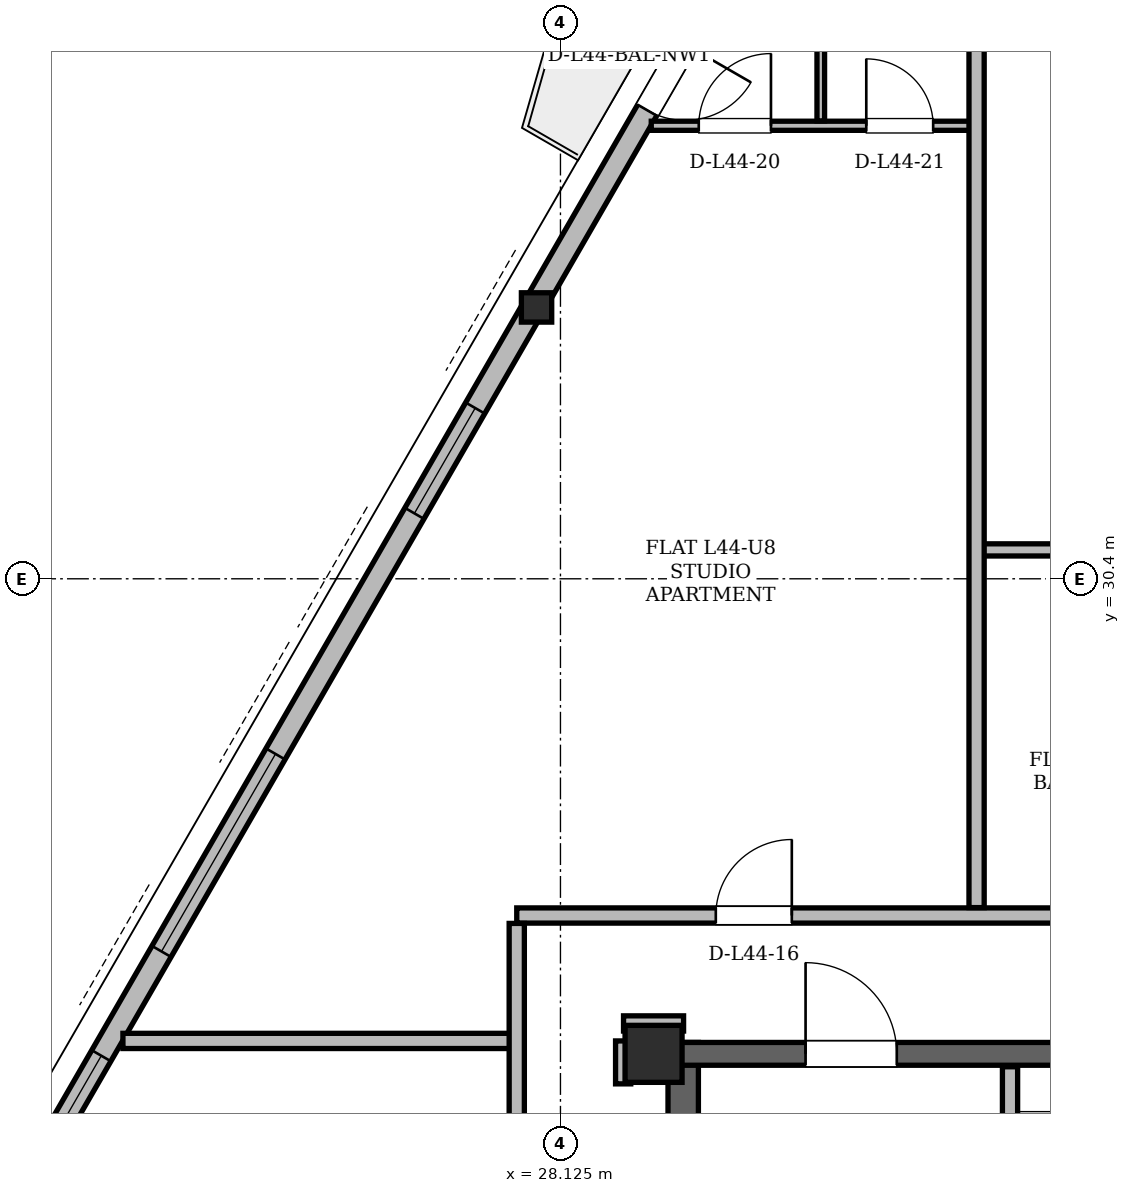
"""IFC4 building model, lengths in metres.
Left out: names, types, materials, properties, quantities, classifications, styles, units other than length and angle.
Written with IfcOpenShell. Run it as: python <this file> out.ifc"""

import sys

from ifc_helpers import new_model, si_unit, direction, frame, frame_2d, origin, origin_2d, place, context, subcontext, project, spatial, rectangle, hollow_rectangle, i_section, extrude, element, fill, save


model = new_model("IFC4")
c1 = context("Model", 3, precision=1e-05, world=origin(), true_north=direction((0.0, 1.0)))
c2 = subcontext(c1, "Body", "Model", "MODEL_VIEW")
j1 = project(units=[si_unit("LENGTHUNIT", "METRE"), si_unit("PLANEANGLEUNIT", "RADIAN")], contexts=[c1])
p1 = place(None, origin())
s1 = spatial("IfcSite", under=j1, at=p1, CompositionType="ELEMENT")
p2 = place(p1, origin())
s2 = spatial("IfcBuilding", under=s1, at=p2, CompositionType="ELEMENT")
p3 = place(p2, frame((0.0, 0.0, 167.4)))
s3 = spatial("IfcBuildingStorey", under=s2, at=p3, CompositionType="ELEMENT", Elevation=167.4)
p4 = place(p3, frame((29.35, 24.15, 0.0), z_axis=(0.0, 0.0, 1.0), x_axis=(1.0, 0.0, 0.0)))
e1 = element("IfcColumn", 1, at=p4, inside=s3, PredefinedType="COLUMN", context=c2, shape_type="SweptSolid", body=[
    extrude(hollow_rectangle(XDim=0.75, YDim=0.75, WallThickness=0.06, at=origin_2d()), origin(), (0.0, 0.0, 1.0), 3.6),
])
p5 = place(p3, frame((27.775, 33.983, 0.005), z_axis=(0.019643523819, -0.00727286176, 0.999780594658), x_axis=(0.34720866797, 0.937787897601, 0.0)))
e2 = element("IfcColumn", 2, at=p5, inside=s3, PredefinedType="COLUMN", context=c2, shape_type="SweptSolid", body=[
    extrude(i_section(OverallWidth=0.399, OverallDepth=0.386, WebThickness=0.021, FlangeThickness=0.033, at=origin_2d()), origin(), (0.0, 0.0, 1.0), 3.592),
])
p6 = place(p3, frame((29.74, 11.0, 0.0), z_axis=(0.0, 0.0, 1.0), x_axis=(0.0, 1.0, 0.0)))
e3 = element("IfcWall", 3, at=p6, inside=s3, PredefinedType="SHEAR", context=c2, shape_type="SweptSolid", body=[
    extrude(rectangle(XDim=13.3, YDim=0.4, at=frame_2d((6.65, 0.0))), origin(), (0.0, 0.0, 1.0), 3.38),
])
p7 = place(p3, frame((29.65, 24.15, 0.0), z_axis=(0.0, 0.0, 1.0), x_axis=(1.0, 0.0, 0.0)))
e4 = element("IfcWall", 4, at=p7, inside=s3, PredefinedType="SHEAR", context=c2, shape_type="SweptSolid", body=[
    extrude(rectangle(XDim=15.7, YDim=0.3, at=frame_2d((7.85, 0.0))), origin(), (0.0, 0.0, 1.0), 3.38),
])
p8 = place(p7, frame((1.7, 0.0, 0.0)))
e5 = element("IfcOpeningElement", 5, at=p8, cuts=e4, PredefinedType="OPENING", context=c2, shape_type="SweptSolid", body=[
    extrude(rectangle(XDim=1.2, YDim=2.2, at=frame_2d((0.6, 1.1))), frame((0.0, 0.15, 0.0), z_axis=(0.0, -1.0, 0.0), x_axis=(1.0, 0.0, 0.0)), (0.0, 0.0, 1.0), 0.3),
])
p9 = place(p7, frame((12.8, 0.0, 0.0)))
e6 = element("IfcOpeningElement", 6, at=p9, cuts=e4, PredefinedType="OPENING", context=c2, shape_type="SweptSolid", body=[
    extrude(rectangle(XDim=1.2, YDim=2.2, at=frame_2d((0.6, 1.1))), frame((0.0, 0.15, 0.0), z_axis=(0.0, -1.0, 0.0), x_axis=(1.0, 0.0, 0.0)), (0.0, 0.0, 1.0), 0.3),
])
p10 = place(p7, frame((6.55, 0.0, 0.0)))
e7 = element("IfcOpeningElement", 7, at=p10, cuts=e4, PredefinedType="OPENING", context=c2, shape_type="SweptSolid", body=[
    extrude(rectangle(XDim=0.9, YDim=2.05, at=frame_2d((0.45, 1.025))), frame((0.0, 0.15, 0.0), z_axis=(0.0, -1.0, 0.0), x_axis=(1.0, 0.0, 0.0)), (0.0, 0.0, 1.0), 0.3),
])
p11 = place(p7, frame((8.45, 0.0, 0.0)))
e8 = element("IfcOpeningElement", 8, at=p11, cuts=e4, PredefinedType="OPENING", context=c2, shape_type="SweptSolid", body=[
    extrude(rectangle(XDim=0.9, YDim=2.05, at=frame_2d((0.45, 1.025))), frame((0.0, 0.15, 0.0), z_axis=(0.0, -1.0, 0.0), x_axis=(1.0, 0.0, 0.0)), (0.0, 0.0, 1.0), 0.3),
])
p12 = place(p3, frame((33.146, 43.285, 0.0), z_axis=(0.0, 0.0, 1.0), x_axis=(-0.499997523705, -0.86602683347, 0.0)))
e9 = element("IfcWall", 9, at=p12, inside=s3, PredefinedType="SOLIDWALL", context=c2, shape_type="SweptSolid", body=[
    extrude(rectangle(XDim=35.802, YDim=0.29, at=frame_2d((17.901, 0.0))), origin(), (0.0, 0.0, 1.0), 2.6),
])
p13 = place(p12, frame((6.76, 0.0, 0.0)))
e10 = element("IfcOpeningElement", 10, at=p13, cuts=e9, PredefinedType="OPENING", context=c2, shape_type="SweptSolid", body=[
    extrude(rectangle(XDim=1.0, YDim=2.18, at=frame_2d((0.5, 1.09))), frame((0.0, 0.145, 0.0), z_axis=(0.0, -1.0, 0.0), x_axis=(1.0, 0.0, 0.0)), (0.0, 0.0, 1.0), 0.29),
])
p14 = place(p12, frame((26.688, 0.0, 0.0)))
e11 = element("IfcOpeningElement", 11, at=p14, cuts=e9, PredefinedType="OPENING", context=c2, shape_type="SweptSolid", body=[
    extrude(rectangle(XDim=1.5, YDim=2.2, at=frame_2d((0.75, 1.1))), frame((0.0, 0.145, 0.0), z_axis=(0.0, -1.0, 0.0), x_axis=(1.0, 0.0, 0.0)), (0.0, 0.0, 1.0), 0.29),
])
p15 = place(p12, frame((33.698, 0.0, 0.85)))
e12 = element("IfcOpeningElement", 12, at=p15, cuts=e9, PredefinedType="OPENING", context=c2, shape_type="SweptSolid", body=[
    extrude(rectangle(XDim=1.2, YDim=1.48, at=frame_2d((0.6, 0.74))), frame((0.0, 0.145, 0.0), z_axis=(0.0, -1.0, 0.0), x_axis=(1.0, 0.0, 0.0)), (0.0, 0.0, 1.0), 0.29),
])
p16 = place(p12, frame((22.123, 0.0, 0.85)))
e13 = element("IfcOpeningElement", 13, at=p16, cuts=e9, PredefinedType="OPENING", context=c2, shape_type="SweptSolid", body=[
    extrude(rectangle(XDim=1.2, YDim=1.48, at=frame_2d((0.6, 0.74))), frame((0.0, 0.145, 0.0), z_axis=(0.0, -1.0, 0.0), x_axis=(1.0, 0.0, 0.0)), (0.0, 0.0, 1.0), 0.29),
])
p17 = place(p12, frame((12.284, 0.0, 0.85)))
e14 = element("IfcOpeningElement", 14, at=p17, cuts=e9, PredefinedType="OPENING", context=c2, shape_type="SweptSolid", body=[
    extrude(rectangle(XDim=1.6, YDim=1.64, at=frame_2d((0.8, 0.82))), frame((0.0, 0.145, 0.0), z_axis=(0.0, -1.0, 0.0), x_axis=(1.0, 0.0, 0.0)), (0.0, 0.0, 1.0), 0.29),
])
p18 = place(p12, frame((17.539, 0.0, 0.85)))
e15 = element("IfcOpeningElement", 15, at=p18, cuts=e9, PredefinedType="OPENING", context=c2, shape_type="SweptSolid", body=[
    extrude(rectangle(XDim=3.0, YDim=1.64, at=frame_2d((1.5, 0.82))), frame((0.0, 0.145, 0.0), z_axis=(0.0, -1.0, 0.0), x_axis=(1.0, 0.0, 0.0)), (0.0, 0.0, 1.0), 0.29),
])
p19 = place(p12, frame((1.23, 0.0, 0.85)))
e16 = element("IfcOpeningElement", 16, at=p19, cuts=e9, PredefinedType="OPENING", context=c2, shape_type="SweptSolid", body=[
    extrude(rectangle(XDim=1.2, YDim=1.48, at=frame_2d((0.6, 0.74))), frame((0.0, 0.145, 0.0), z_axis=(0.0, -1.0, 0.0), x_axis=(1.0, 0.0, 0.0)), (0.0, 0.0, 1.0), 0.29),
])
p20 = place(p12, frame((30.487, 0.0, 0.85)))
e17 = element("IfcOpeningElement", 17, at=p20, cuts=e9, PredefinedType="OPENING", context=c2, shape_type="SweptSolid", body=[
    extrude(rectangle(XDim=1.2, YDim=1.48, at=frame_2d((0.6, 0.74))), frame((0.0, 0.145, 0.0), z_axis=(0.0, -1.0, 0.0), x_axis=(1.0, 0.0, 0.0)), (0.0, 0.0, 1.0), 0.29),
])
p21 = place(p3, frame((34.04, 19.48, 0.0), z_axis=(0.0, 0.0, 1.0), x_axis=(0.0, 1.0, 0.0)))
e18 = element("IfcWall", 18, at=p21, inside=s3, PredefinedType="PARTITIONING", context=c2, shape_type="SweptSolid", body=[
    extrude(rectangle(XDim=4.5, YDim=0.2, at=frame_2d((2.25, 0.0))), origin(), (0.0, 0.0, 1.0), 3.38),
])
p22 = place(p21, frame((2.12, 0.0, 0.0)))
e19 = element("IfcOpeningElement", 19, at=p22, cuts=e18, PredefinedType="OPENING", context=c2, shape_type="SweptSolid", body=[
    extrude(rectangle(XDim=1.1, YDim=2.2, at=frame_2d((0.55, 1.1))), frame((0.0, 0.1, 0.0), z_axis=(0.0, -1.0, 0.0), x_axis=(1.0, 0.0, 0.0)), (0.0, 0.0, 1.0), 0.2),
])
p23 = place(p3, frame((22.368, 24.32, 0.0), z_axis=(0.0, 0.0, 1.0), x_axis=(1.0, 0.0, 0.0)))
e20 = element("IfcWall", 20, at=p23, inside=s3, PredefinedType="PARTITIONING", context=c2, shape_type="SweptSolid", body=[
    extrude(rectangle(XDim=5.182, YDim=0.2, at=frame_2d((2.591, 0.0))), origin(), (0.0, 0.0, 1.0), 3.38),
])
p24 = place(p3, frame((28.955, 24.55, 0.0), z_axis=(0.0, 0.0, 1.0), x_axis=(1.0, 0.0, 0.0)))
e21 = element("IfcWall", 21, at=p24, inside=s3, PredefinedType="PARTITIONING", context=c2, shape_type="SweptSolid", body=[
    extrude(rectangle(XDim=0.79, YDim=0.2, at=frame_2d((0.395, 0.0))), origin(), (0.0, 0.0, 1.0), 2.842),
])
p25 = place(p3, frame((27.55, 25.97, 0.0), z_axis=(0.0, 0.0, 1.0), x_axis=(1.0, 0.0, 0.0)))
e22 = element("IfcWall", 22, at=p25, inside=s3, PredefinedType="PARTITIONING", context=c2, shape_type="SweptSolid", body=[
    extrude(rectangle(XDim=9.15, YDim=0.2, at=frame_2d((4.575, 0.0))), origin(), (0.0, 0.0, 1.0), 2.842),
])
p26 = place(p25, frame((2.619, 0.0, 0.0)))
e23 = element("IfcOpeningElement", 23, at=p26, cuts=e22, PredefinedType="OPENING", context=c2, shape_type="SweptSolid", body=[
    extrude(rectangle(XDim=1.0, YDim=2.18, at=frame_2d((0.5, 1.09))), frame((0.0, 0.1, 0.0), z_axis=(0.0, -1.0, 0.0), x_axis=(1.0, 0.0, 0.0)), (0.0, 0.0, 1.0), 0.2),
])
p27 = place(p3, frame((33.518, 30.78, 0.0), z_axis=(0.0, 0.0, 1.0), x_axis=(1.0, 0.0, 0.0)))
e24 = element("IfcWall", 24, at=p27, inside=s3, PredefinedType="PARTITIONING", context=c2, shape_type="SweptSolid", body=[
    extrude(rectangle(XDim=3.264, YDim=0.16, at=frame_2d((1.632, 0.0))), origin(), (0.0, 0.0, 1.0), 3.38),
])
p28 = place(p27, frame((1.192, 0.0, 0.0)))
e25 = element("IfcOpeningElement", 25, at=p28, cuts=e24, PredefinedType="OPENING", context=c2, shape_type="SweptSolid", body=[
    extrude(rectangle(XDim=0.88, YDim=2.08, at=frame_2d((0.44, 1.04))), frame((0.0, 0.08, 0.0), z_axis=(0.0, -1.0, 0.0), x_axis=(1.0, 0.0, 0.0)), (0.0, 0.0, 1.0), 0.16),
])
p29 = place(p3, frame((29.32, 36.36, 0.0), z_axis=(0.0, 0.0, 1.0), x_axis=(1.0, 0.0, 0.0)))
e26 = element("IfcWall", 26, at=p29, inside=s3, PredefinedType="PARTITIONING", context=c2, shape_type="SweptSolid", body=[
    extrude(rectangle(XDim=4.33, YDim=0.12, at=frame_2d((2.165, 0.0))), origin(), (0.0, 0.0, 1.0), 3.38),
])
p30 = place(p29, frame((0.625, 0.0, 0.0)))
e27 = element("IfcOpeningElement", 27, at=p30, cuts=e26, PredefinedType="OPENING", context=c2, shape_type="SweptSolid", body=[
    extrude(rectangle(XDim=0.95, YDim=2.1, at=frame_2d((0.475, 1.05))), frame((0.0, 0.06, 0.0), z_axis=(0.0, -1.0, 0.0), x_axis=(1.0, 0.0, 0.0)), (0.0, 0.0, 1.0), 0.12),
])
p31 = place(p29, frame((2.829, 0.0, 0.0)))
e28 = element("IfcOpeningElement", 28, at=p31, cuts=e26, PredefinedType="OPENING", context=c2, shape_type="SweptSolid", body=[
    extrude(rectangle(XDim=0.88, YDim=2.08, at=frame_2d((0.44, 1.04))), frame((0.0, 0.06, 0.0), z_axis=(0.0, -1.0, 0.0), x_axis=(1.0, 0.0, 0.0)), (0.0, 0.0, 1.0), 0.12),
])
p32 = place(p3, frame((27.55, 18.554, 0.0), z_axis=(0.0, 0.0, 1.0), x_axis=(0.0, 1.0, 0.0)))
e29 = element("IfcWall", 29, at=p32, inside=s3, PredefinedType="PARTITIONING", context=c2, shape_type="SweptSolid", body=[
    extrude(rectangle(XDim=7.312, YDim=0.2, at=frame_2d((3.656, 0.0))), origin(), (0.0, 0.0, 1.0), 3.38),
])
p33 = place(p32, frame((2.257, 0.0, 0.0)))
e30 = element("IfcOpeningElement", 30, at=p33, cuts=e29, PredefinedType="OPENING", context=c2, shape_type="SweptSolid", body=[
    extrude(rectangle(XDim=1.0, YDim=2.18, at=frame_2d((0.5, 1.09))), frame((0.0, 0.1, 0.0), z_axis=(0.0, -1.0, 0.0), x_axis=(1.0, 0.0, 0.0)), (0.0, 0.0, 1.0), 0.2),
])
p34 = place(p3, frame((28.95, 23.755, 0.0), z_axis=(0.0, 0.0, 1.0), x_axis=(0.0, 1.0, 0.0)))
e31 = element("IfcWall", 31, at=p34, inside=s3, PredefinedType="PARTITIONING", context=c2, shape_type="SweptSolid", body=[
    extrude(rectangle(XDim=0.565, YDim=0.2, at=frame_2d((0.283, 0.0))), origin(), (0.0, 0.0, 1.0), 3.38),
])
p35 = place(p3, frame((31.55, 36.424, 0.0), z_axis=(0.0, 0.0, 1.0), x_axis=(0.0, 1.0, 0.0)))
e32 = element("IfcWall", 32, at=p35, inside=s3, PredefinedType="PARTITIONING", context=c2, shape_type="SweptSolid", body=[
    extrude(rectangle(XDim=3.799, YDim=0.1, at=frame_2d((1.899, 0.0))), origin(), (0.0, 0.0, 1.0), 3.38),
])
p36 = place(p3, frame((33.6, 26.074, 0.0), z_axis=(0.0, 0.0, 1.0), x_axis=(0.0, 1.0, 0.0)))
e33 = element("IfcWall", 33, at=p36, inside=s3, PredefinedType="PARTITIONING", context=c2, shape_type="SweptSolid", body=[
    extrude(rectangle(XDim=17.062, YDim=0.2, at=frame_2d((8.531, 0.0))), origin(), (0.0, 0.0, 1.0), 3.38),
])
p37 = place(p13, origin())
e34 = element("IfcDoor", 34, at=p37, inside=s3, OperationType="SINGLE_SWING_LEFT", PredefinedType="DOOR", context=c2, shape_type="SweptSolid", body=[
    extrude(rectangle(XDim=1.0, YDim=2.18, at=frame_2d((0.5, 1.09))), frame((0.0, 0.025, 0.0), z_axis=(0.0, -1.0, 0.0), x_axis=(1.0, 0.0, 0.0)), (0.0, 0.0, 1.0), 0.05),
])
fill(e10, e34)
p38 = place(p16, origin())
e35 = element("IfcWindow", 35, at=p38, inside=s3, PartitioningType="SINGLE_PANEL", PredefinedType="WINDOW", context=c2, shape_type="SweptSolid", body=[
    extrude(rectangle(XDim=1.2, YDim=1.48, at=frame_2d((0.6, 0.74))), frame((0.0, 0.03, 0.0), z_axis=(0.0, -1.0, 0.0), x_axis=(1.0, 0.0, 0.0)), (0.0, 0.0, 1.0), 0.06),
])
fill(e13, e35)
p39 = place(p17, origin())
e36 = element("IfcWindow", 36, at=p39, inside=s3, PartitioningType="SINGLE_PANEL", PredefinedType="WINDOW", context=c2, shape_type="SweptSolid", body=[
    extrude(rectangle(XDim=1.6, YDim=1.64, at=frame_2d((0.8, 0.82))), frame((0.0, 0.03, 0.0), z_axis=(0.0, -1.0, 0.0), x_axis=(1.0, 0.0, 0.0)), (0.0, 0.0, 1.0), 0.06),
])
fill(e14, e36)
p40 = place(p18, origin())
e37 = element("IfcWindow", 37, at=p40, inside=s3, PartitioningType="SINGLE_PANEL", PredefinedType="WINDOW", context=c2, shape_type="SweptSolid", body=[
    extrude(rectangle(XDim=3.0, YDim=1.64, at=frame_2d((1.5, 0.82))), frame((0.0, 0.03, 0.0), z_axis=(0.0, -1.0, 0.0), x_axis=(1.0, 0.0, 0.0)), (0.0, 0.0, 1.0), 0.06),
])
fill(e15, e37)
p41 = place(p8, origin())
e38 = element("IfcDoor", 38, at=p41, inside=s3, OperationType="SINGLE_SWING_LEFT", PredefinedType="DOOR", context=c2, shape_type="SweptSolid", body=[
    extrude(rectangle(XDim=1.2, YDim=2.2, at=frame_2d((0.6, 1.1))), frame((0.0, 0.025, 0.0), z_axis=(0.0, -1.0, 0.0), x_axis=(1.0, 0.0, 0.0)), (0.0, 0.0, 1.0), 0.05),
])
fill(e5, e38)
p42 = place(p26, origin())
e39 = element("IfcDoor", 39, at=p42, inside=s3, OperationType="SINGLE_SWING_RIGHT", PredefinedType="DOOR", context=c2, shape_type="SweptSolid", body=[
    extrude(rectangle(XDim=1.0, YDim=2.18, at=frame_2d((0.5, 1.09))), frame((0.0, 0.025, 0.0), z_axis=(0.0, -1.0, 0.0), x_axis=(1.0, 0.0, 0.0)), (0.0, 0.0, 1.0), 0.05),
])
fill(e23, e39)
p43 = place(p30, origin())
e40 = element("IfcDoor", 40, at=p43, inside=s3, OperationType="SINGLE_SWING_RIGHT", PredefinedType="DOOR", context=c2, shape_type="SweptSolid", body=[
    extrude(rectangle(XDim=0.95, YDim=2.1, at=frame_2d((0.475, 1.05))), frame((0.0, 0.025, 0.0), z_axis=(0.0, -1.0, 0.0), x_axis=(1.0, 0.0, 0.0)), (0.0, 0.0, 1.0), 0.05),
])
fill(e27, e40)
p44 = place(p31, origin())
e41 = element("IfcDoor", 41, at=p44, inside=s3, OperationType="SINGLE_SWING_LEFT", PredefinedType="DOOR", context=c2, shape_type="SweptSolid", body=[
    extrude(rectangle(XDim=0.88, YDim=2.08, at=frame_2d((0.44, 1.04))), frame((0.0, 0.025, 0.0), z_axis=(0.0, -1.0, 0.0), x_axis=(1.0, 0.0, 0.0)), (0.0, 0.0, 1.0), 0.05),
])
fill(e28, e41)
save(model, sys.argv[1])
